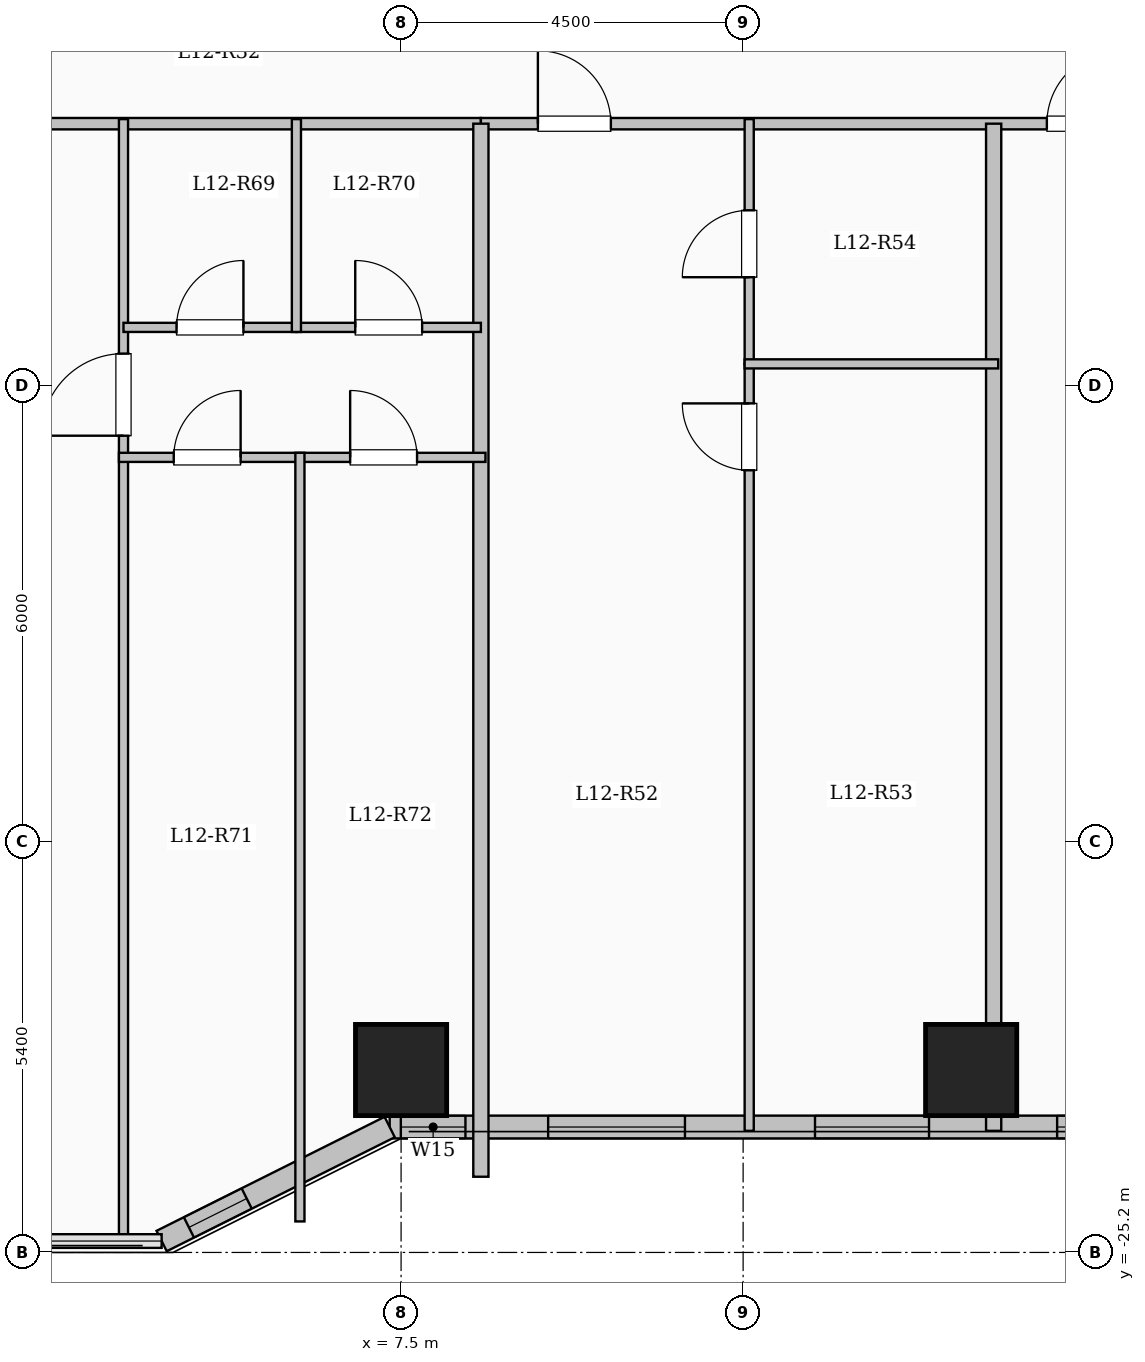
"""IFC4 building model, lengths in metres.
Left out: names, types, materials, properties, quantities, classifications, styles, units other than length and angle.
Written with IfcOpenShell. Run it as: python <this file> out.ifc"""

import sys

from ifc_helpers import new_model, si_unit, direction, frame, frame_2d, origin, origin_2d, place, context, subcontext, project, spatial, rectangle, extrude, element, fill, save


model = new_model("IFC4")
c1 = context("Model", 3, precision=1e-05, world=origin(), true_north=direction((0.0, 1.0)))
c2 = subcontext(c1, "Body", "Model", "MODEL_VIEW")
j1 = project(units=[si_unit("LENGTHUNIT", "METRE"), si_unit("PLANEANGLEUNIT", "RADIAN")], contexts=[c1])
p1 = place(None, origin())
s1 = spatial("IfcSite", under=j1, at=p1, CompositionType="ELEMENT")
p2 = place(p1, origin())
s2 = spatial("IfcBuilding", under=s1, at=p2, CompositionType="ELEMENT")
p3 = place(p2, frame((0.0, 0.0, 47.45)))
s3 = spatial("IfcBuildingStorey", under=s2, at=p3, CompositionType="ELEMENT", Elevation=47.45)
for number, where, z_axis, x_axis in (
    (1, (7.5, -22.8, 0.0), (0.0, 0.0, 1.0), (1.0, 0.0, 0.0)),
    (2, (15.0, -22.8, 0.0), (0.0, 0.0, 1.0), (1.0, 0.0, 0.0)),
):
    element("IfcColumn", number, at=place(p3, frame(where, z_axis=z_axis, x_axis=x_axis)), inside=s3, PredefinedType="COLUMN", context=c2, shape_type="SweptSolid", body=[
        extrude(rectangle(XDim=1.2, YDim=1.2, at=origin_2d()), origin(), (0.0, 0.0, 1.0), 3.35),
    ])
p4 = place(p3, frame((22.65, -23.55, 0.0), z_axis=(0.0, 0.0, 1.0), x_axis=(-1.0, 0.0, 0.0)))
e3 = element("IfcWall", 3, at=p4, inside=s3, PredefinedType="SOLIDWALL", context=c2, shape_type="SweptSolid", body=[
    extrude(rectangle(XDim=15.3, YDim=0.3, at=frame_2d((7.65, 0.0))), origin(), (0.0, 0.0, 1.0), 3.1),
])
p5 = place(p4, frame((0.509, 0.0, 0.95)))
e4 = element("IfcOpeningElement", 4, at=p5, cuts=e3, PredefinedType="OPENING", context=c2, shape_type="SweptSolid", body=[
    extrude(rectangle(XDim=1.2, YDim=1.5, at=frame_2d((0.6, 0.75))), frame((0.0, 0.16, 0.0), z_axis=(0.0, -1.0, 0.0), x_axis=(1.0, 0.0, 0.0)), (0.0, 0.0, 1.0), 0.32),
])
p6 = place(p4, frame((2.585, 0.0, 0.95)))
e5 = element("IfcOpeningElement", 5, at=p6, cuts=e3, PredefinedType="OPENING", context=c2, shape_type="SweptSolid", body=[
    extrude(rectangle(XDim=1.2, YDim=1.5, at=frame_2d((0.6, 0.75))), frame((0.0, 0.16, 0.0), z_axis=(0.0, -1.0, 0.0), x_axis=(1.0, 0.0, 0.0)), (0.0, 0.0, 1.0), 0.32),
])
p7 = place(p4, frame((5.019, 0.0, 0.9)))
e6 = element("IfcOpeningElement", 6, at=p7, cuts=e3, PredefinedType="OPENING", context=c2, shape_type="SweptSolid", body=[
    extrude(rectangle(XDim=1.5, YDim=1.65, at=frame_2d((0.75, 0.825))), frame((0.0, 0.16, 0.0), z_axis=(0.0, -1.0, 0.0), x_axis=(1.0, 0.0, 0.0)), (0.0, 0.0, 1.0), 0.32),
])
p8 = place(p4, frame((8.204, 0.0, 0.9)))
e7 = element("IfcOpeningElement", 7, at=p8, cuts=e3, PredefinedType="OPENING", context=c2, shape_type="SweptSolid", body=[
    extrude(rectangle(XDim=1.5, YDim=1.65, at=frame_2d((0.75, 0.825))), frame((0.0, 0.16, 0.0), z_axis=(0.0, -1.0, 0.0), x_axis=(1.0, 0.0, 0.0)), (0.0, 0.0, 1.0), 0.32),
])
p9 = place(p4, frame((11.415, 0.0, 0.9)))
e8 = element("IfcOpeningElement", 8, at=p9, cuts=e3, PredefinedType="OPENING", context=c2, shape_type="SweptSolid", body=[
    extrude(rectangle(XDim=1.8, YDim=1.65, at=frame_2d((0.9, 0.825))), frame((0.0, 0.16, 0.0), z_axis=(0.0, -1.0, 0.0), x_axis=(1.0, 0.0, 0.0)), (0.0, 0.0, 1.0), 0.32),
])
p10 = place(p4, frame((14.303, 0.0, 0.95)))
e9 = element("IfcOpeningElement", 9, at=p10, cuts=e3, PredefinedType="OPENING", context=c2, shape_type="SweptSolid", body=[
    extrude(rectangle(XDim=0.85, YDim=1.5, at=frame_2d((0.425, 0.75))), frame((0.0, 0.16, 0.0), z_axis=(0.0, -1.0, 0.0), x_axis=(1.0, 0.0, 0.0)), (0.0, 0.0, 1.0), 0.32),
])
p11 = place(p3, frame((7.35, -23.55, 0.0), z_axis=(0.0, 0.0, 1.0), x_axis=(-0.894427191, -0.4472135955, 0.0)))
e10 = element("IfcWall", 10, at=p11, inside=s3, PredefinedType="SOLIDWALL", context=c2, shape_type="SweptSolid", body=[
    extrude(rectangle(XDim=3.354, YDim=0.3, at=frame_2d((1.677, 0.0))), origin(), (0.0, 0.0, 1.0), 3.1),
])
p12 = place(p11, frame((2.103, 0.0, 0.95)))
e11 = element("IfcOpeningElement", 11, at=p12, cuts=e10, PredefinedType="OPENING", context=c2, shape_type="SweptSolid", body=[
    extrude(rectangle(XDim=0.85, YDim=1.5, at=frame_2d((0.425, 0.75))), frame((0.0, 0.16, 0.0), z_axis=(0.0, -1.0, 0.0), x_axis=(1.0, 0.0, 0.0)), (0.0, 0.0, 1.0), 0.32),
])
p13 = place(p3, frame((-8.55, -10.35, 0.0), z_axis=(0.0, 0.0, 1.0), x_axis=(1.0, 0.0, 0.0)))
e12 = element("IfcWall", 12, at=p13, inside=s3, PredefinedType="PARTITIONING", context=c2, shape_type="SweptSolid", body=[
    extrude(rectangle(XDim=17.1, YDim=0.15, at=frame_2d((8.55, 0.0))), origin(), (0.0, 0.0, 1.0), 3.1),
])
p14 = place(p13, frame((0.8, 0.0, 0.0)))
e13 = element("IfcOpeningElement", 13, at=p14, cuts=e12, PredefinedType="OPENING", context=c2, shape_type="SweptSolid", body=[
    extrude(rectangle(XDim=0.96, YDim=2.15, at=frame_2d((0.48, 1.075))), frame((0.0, 0.085, 0.0), z_axis=(0.0, -1.0, 0.0), x_axis=(1.0, 0.0, 0.0)), (0.0, 0.0, 1.0), 0.17),
])
p15 = place(p13, frame((8.495, 0.0, 0.0)))
e14 = element("IfcOpeningElement", 14, at=p15, cuts=e12, PredefinedType="OPENING", context=c2, shape_type="SweptSolid", body=[
    extrude(rectangle(XDim=0.96, YDim=2.15, at=frame_2d((0.48, 1.075))), frame((0.0, 0.085, 0.0), z_axis=(0.0, -1.0, 0.0), x_axis=(1.0, 0.0, 0.0)), (0.0, 0.0, 1.0), 0.17),
])
p16 = place(p3, frame((8.55, -10.35, 0.0), z_axis=(0.0, 0.0, 1.0), x_axis=(1.0, 0.0, 0.0)))
e15 = element("IfcWall", 15, at=p16, inside=s3, PredefinedType="PARTITIONING", context=c2, shape_type="SweptSolid", body=[
    extrude(rectangle(XDim=14.0, YDim=0.15, at=frame_2d((7.0, 0.0))), origin(), (0.0, 0.0, 1.0), 3.1),
])
p17 = place(p16, frame((0.75, 0.0, 0.0)))
e16 = element("IfcOpeningElement", 16, at=p17, cuts=e15, PredefinedType="OPENING", context=c2, shape_type="SweptSolid", body=[
    extrude(rectangle(XDim=0.96, YDim=2.15, at=frame_2d((0.48, 1.075))), frame((0.0, 0.085, 0.0), z_axis=(0.0, -1.0, 0.0), x_axis=(1.0, 0.0, 0.0)), (0.0, 0.0, 1.0), 0.17),
])
p18 = place(p16, frame((7.446, 0.0, 0.0)))
e17 = element("IfcOpeningElement", 17, at=p18, cuts=e15, PredefinedType="OPENING", context=c2, shape_type="SweptSolid", body=[
    extrude(rectangle(XDim=0.96, YDim=2.15, at=frame_2d((0.48, 1.075))), frame((0.0, 0.085, 0.0), z_axis=(0.0, -1.0, 0.0), x_axis=(1.0, 0.0, 0.0)), (0.0, 0.0, 1.0), 0.17),
])
p19 = place(p3, frame((15.296, -23.6, 0.0), z_axis=(0.0, 0.0, 1.0), x_axis=(0.0, 1.0, 0.0)))
e18 = element("IfcWall", 18, at=p19, inside=s3, PredefinedType="SOLIDWALL", context=c2, shape_type="SweptSolid", body=[
    extrude(rectangle(XDim=13.25, YDim=0.2, at=frame_2d((6.625, 0.0))), origin(), (0.0, 0.0, 1.0), 2.435),
])
p20 = place(p3, frame((12.08, -23.6, 0.0), z_axis=(0.0, 0.0, 1.0), x_axis=(0.0, 1.0, 0.0)))
e19 = element("IfcWall", 19, at=p20, inside=s3, PredefinedType="PARTITIONING", context=c2, shape_type="SweptSolid", body=[
    extrude(rectangle(XDim=10.09, YDim=0.12, at=frame_2d((5.045, 0.0))), origin(), (0.0, 0.0, 1.0), 3.1),
])
p21 = place(p20, frame((8.69, 0.0, 0.0)))
e20 = element("IfcOpeningElement", 20, at=p21, cuts=e19, PredefinedType="OPENING", context=c2, shape_type="SweptSolid", body=[
    extrude(rectangle(XDim=0.88, YDim=2.1, at=frame_2d((0.44, 1.05))), frame((0.0, 0.07, 0.0), z_axis=(0.0, -1.0, 0.0), x_axis=(1.0, 0.0, 0.0)), (0.0, 0.0, 1.0), 0.14),
])
p22 = place(p3, frame((12.08, -13.51, 0.0), z_axis=(0.0, 0.0, 1.0), x_axis=(0.0, 1.0, 0.0)))
e21 = element("IfcWall", 21, at=p22, inside=s3, PredefinedType="PARTITIONING", context=c2, shape_type="SweptSolid", body=[
    extrude(rectangle(XDim=3.22, YDim=0.12, at=frame_2d((1.61, 0.0))), origin(), (0.0, 0.0, 1.0), 3.1),
])
p23 = place(p22, frame((1.14, 0.0, 0.0)))
e22 = element("IfcOpeningElement", 22, at=p23, cuts=e21, PredefinedType="OPENING", context=c2, shape_type="SweptSolid", body=[
    extrude(rectangle(XDim=0.88, YDim=2.1, at=frame_2d((0.44, 1.05))), frame((0.0, 0.07, 0.0), z_axis=(0.0, -1.0, 0.0), x_axis=(1.0, 0.0, 0.0)), (0.0, 0.0, 1.0), 0.14),
])
p24 = place(p3, frame((12.02, -13.51, 0.0), z_axis=(0.0, 0.0, 1.0), x_axis=(1.0, 0.0, 0.0)))
e23 = element("IfcWall", 23, at=p24, inside=s3, PredefinedType="PARTITIONING", context=c2, shape_type="SweptSolid", body=[
    extrude(rectangle(XDim=3.336, YDim=0.12, at=frame_2d((1.668, 0.0))), origin(), (0.0, 0.0, 1.0), 3.1),
])
p25 = place(p3, frame((8.55, -24.204, 0.0), z_axis=(0.0, 0.0, 1.0), x_axis=(0.0, 1.0, 0.0)))
e24 = element("IfcWall", 24, at=p25, inside=s3, PredefinedType="SOLIDWALL", context=c2, shape_type="SweptSolid", body=[
    extrude(rectangle(XDim=13.854, YDim=0.2, at=frame_2d((6.927, 0.0))), origin(), (0.0, 0.0, 1.0), 3.1),
])
p26 = place(p3, frame((3.848, -25.08, 0.0), z_axis=(0.0, 0.0, 1.0), x_axis=(0.0, 1.0, 0.0)))
e25 = element("IfcWall", 25, at=p26, inside=s3, PredefinedType="PARTITIONING", context=c2, shape_type="SweptSolid", body=[
    extrude(rectangle(XDim=14.79, YDim=0.12, at=frame_2d((7.395, 0.0))), origin(), (0.0, 0.0, 1.0), 3.1),
])
p27 = place(p26, frame((10.625, 0.0, 0.0)))
e26 = element("IfcOpeningElement", 26, at=p27, cuts=e25, PredefinedType="OPENING", context=c2, shape_type="SweptSolid", body=[
    extrude(rectangle(XDim=1.08, YDim=2.15, at=frame_2d((0.54, 1.075))), frame((0.0, 0.07, 0.0), z_axis=(0.0, -1.0, 0.0), x_axis=(1.0, 0.0, 0.0)), (0.0, 0.0, 1.0), 0.14),
])
p28 = place(p3, frame((3.848, -13.03, 0.0), z_axis=(0.0, 0.0, 1.0), x_axis=(1.0, 0.0, 0.0)))
e27 = element("IfcWall", 27, at=p28, inside=s3, PredefinedType="PARTITIONING", context=c2, shape_type="SweptSolid", body=[
    extrude(rectangle(XDim=2.275, YDim=0.12, at=frame_2d((1.138, 0.0))), origin(), (0.0, 0.0, 1.0), 2.585),
])
p29 = place(p28, frame((0.698, 0.0, 0.0)))
e28 = element("IfcOpeningElement", 28, at=p29, cuts=e27, PredefinedType="OPENING", context=c2, shape_type="SweptSolid", body=[
    extrude(rectangle(XDim=0.88, YDim=2.1, at=frame_2d((0.44, 1.05))), frame((0.0, 0.07, 0.0), z_axis=(0.0, -1.0, 0.0), x_axis=(1.0, 0.0, 0.0)), (0.0, 0.0, 1.0), 0.14),
])
p30 = place(p3, frame((6.123, -13.03, 0.0), z_axis=(0.0, 0.0, 1.0), x_axis=(1.0, 0.0, 0.0)))
e29 = element("IfcWall", 29, at=p30, inside=s3, PredefinedType="PARTITIONING", context=c2, shape_type="SweptSolid", body=[
    extrude(rectangle(XDim=2.427, YDim=0.12, at=frame_2d((1.213, 0.0))), origin(), (0.0, 0.0, 1.0), 2.585),
])
p31 = place(p30, frame((0.774, 0.0, 0.0)))
e30 = element("IfcOpeningElement", 30, at=p31, cuts=e29, PredefinedType="OPENING", context=c2, shape_type="SweptSolid", body=[
    extrude(rectangle(XDim=0.88, YDim=2.1, at=frame_2d((0.44, 1.05))), frame((0.0, 0.07, 0.0), z_axis=(0.0, -1.0, 0.0), x_axis=(1.0, 0.0, 0.0)), (0.0, 0.0, 1.0), 0.14),
])
p32 = place(p3, frame((3.788, -14.74, 0.0), z_axis=(0.0, 0.0, 1.0), x_axis=(1.0, 0.0, 0.0)))
e31 = element("IfcWall", 31, at=p32, inside=s3, PredefinedType="PARTITIONING", context=c2, shape_type="SweptSolid", body=[
    extrude(rectangle(XDim=4.822, YDim=0.12, at=frame_2d((2.411, 0.0))), origin(), (0.0, 0.0, 1.0), 2.585),
])
p33 = place(p32, frame((0.721, 0.0, 0.0)))
e32 = element("IfcOpeningElement", 32, at=p33, cuts=e31, PredefinedType="OPENING", context=c2, shape_type="SweptSolid", body=[
    extrude(rectangle(XDim=0.88, YDim=2.1, at=frame_2d((0.44, 1.05))), frame((0.0, 0.07, 0.0), z_axis=(0.0, -1.0, 0.0), x_axis=(1.0, 0.0, 0.0)), (0.0, 0.0, 1.0), 0.14),
])
p34 = place(p32, frame((3.042, 0.0, 0.0)))
e33 = element("IfcOpeningElement", 33, at=p34, cuts=e31, PredefinedType="OPENING", context=c2, shape_type="SweptSolid", body=[
    extrude(rectangle(XDim=0.88, YDim=2.1, at=frame_2d((0.44, 1.05))), frame((0.0, 0.07, 0.0), z_axis=(0.0, -1.0, 0.0), x_axis=(1.0, 0.0, 0.0)), (0.0, 0.0, 1.0), 0.14),
])
p35 = place(p3, frame((6.123, -13.09, 0.0), z_axis=(0.0, 0.0, 1.0), x_axis=(0.0, 1.0, 0.0)))
e34 = element("IfcWall", 34, at=p35, inside=s3, PredefinedType="PARTITIONING", context=c2, shape_type="SweptSolid", body=[
    extrude(rectangle(XDim=2.8, YDim=0.12, at=frame_2d((1.4, 0.0))), origin(), (0.0, 0.0, 1.0), 3.1),
])
p36 = place(p3, frame((6.169, -24.792, 0.0), z_axis=(0.0, 0.0, 1.0), x_axis=(0.0, 1.0, 0.0)))
e35 = element("IfcWall", 35, at=p36, inside=s3, PredefinedType="PARTITIONING", context=c2, shape_type="SweptSolid", body=[
    extrude(rectangle(XDim=10.112, YDim=0.12, at=frame_2d((5.056, 0.0))), origin(), (0.0, 0.0, 1.0), 3.1),
])
p37 = place(p7, origin())
e36 = element("IfcWindow", 36, at=p37, inside=s3, PartitioningType="SINGLE_PANEL", PredefinedType="WINDOW", context=c2, shape_type="SweptSolid", body=[
    extrude(rectangle(XDim=1.5, YDim=1.65, at=frame_2d((0.75, 0.825))), frame((0.0, 0.03, 0.0), z_axis=(0.0, -1.0, 0.0), x_axis=(1.0, 0.0, 0.0)), (0.0, 0.0, 1.0), 0.06),
])
fill(e6, e36)
p38 = place(p8, origin())
e37 = element("IfcWindow", 37, at=p38, inside=s3, PartitioningType="SINGLE_PANEL", PredefinedType="WINDOW", context=c2, shape_type="SweptSolid", body=[
    extrude(rectangle(XDim=1.5, YDim=1.65, at=frame_2d((0.75, 0.825))), frame((0.0, 0.03, 0.0), z_axis=(0.0, -1.0, 0.0), x_axis=(1.0, 0.0, 0.0)), (0.0, 0.0, 1.0), 0.06),
])
fill(e7, e37)
p39 = place(p9, origin())
e38 = element("IfcWindow", 38, at=p39, inside=s3, PartitioningType="SINGLE_PANEL", PredefinedType="WINDOW", context=c2, shape_type="SweptSolid", body=[
    extrude(rectangle(XDim=1.8, YDim=1.65, at=frame_2d((0.9, 0.825))), frame((0.0, 0.03, 0.0), z_axis=(0.0, -1.0, 0.0), x_axis=(1.0, 0.0, 0.0)), (0.0, 0.0, 1.0), 0.06),
])
fill(e8, e38)
p40 = place(p10, origin())
e39 = element("IfcWindow", 39, at=p40, inside=s3, PartitioningType="SINGLE_PANEL", PredefinedType="WINDOW", context=c2, shape_type="SweptSolid", body=[
    extrude(rectangle(XDim=0.85, YDim=1.5, at=frame_2d((0.425, 0.75))), frame((0.0, 0.03, 0.0), z_axis=(0.0, -1.0, 0.0), x_axis=(1.0, 0.0, 0.0)), (0.0, 0.0, 1.0), 0.06),
])
fill(e9, e39)
p41 = place(p12, origin())
e40 = element("IfcWindow", 40, at=p41, inside=s3, PartitioningType="SINGLE_PANEL", PredefinedType="WINDOW", context=c2, shape_type="SweptSolid", body=[
    extrude(rectangle(XDim=0.85, YDim=1.5, at=frame_2d((0.425, 0.75))), frame((0.0, 0.03, 0.0), z_axis=(0.0, -1.0, 0.0), x_axis=(1.0, 0.0, 0.0)), (0.0, 0.0, 1.0), 0.06),
])
fill(e11, e40)
p42 = place(p17, origin())
e41 = element("IfcDoor", 41, at=p42, inside=s3, OperationType="SINGLE_SWING_LEFT", PredefinedType="DOOR", context=c2, shape_type="SweptSolid", body=[
    extrude(rectangle(XDim=0.96, YDim=2.15, at=frame_2d((0.48, 1.075))), frame((0.0, 0.025, 0.0), z_axis=(0.0, -1.0, 0.0), x_axis=(1.0, 0.0, 0.0)), (0.0, 0.0, 1.0), 0.05),
])
fill(e16, e41)
p43 = place(p21, origin())
e42 = element("IfcDoor", 42, at=p43, inside=s3, OperationType="SINGLE_SWING_RIGHT", PredefinedType="DOOR", context=c2, shape_type="SweptSolid", body=[
    extrude(rectangle(XDim=0.88, YDim=2.1, at=frame_2d((0.44, 1.05))), frame((0.0, 0.025, 0.0), z_axis=(0.0, -1.0, 0.0), x_axis=(1.0, 0.0, 0.0)), (0.0, 0.0, 1.0), 0.05),
])
fill(e20, e42)
p44 = place(p23, origin())
e43 = element("IfcDoor", 43, at=p44, inside=s3, OperationType="SINGLE_SWING_LEFT", PredefinedType="DOOR", context=c2, shape_type="SweptSolid", body=[
    extrude(rectangle(XDim=0.88, YDim=2.1, at=frame_2d((0.44, 1.05))), frame((0.0, 0.025, 0.0), z_axis=(0.0, -1.0, 0.0), x_axis=(1.0, 0.0, 0.0)), (0.0, 0.0, 1.0), 0.05),
])
fill(e22, e43)
p45 = place(p18, origin())
e44 = element("IfcDoor", 44, at=p45, inside=s3, OperationType="SINGLE_SWING_RIGHT", PredefinedType="DOOR", context=c2, shape_type="SweptSolid", body=[
    extrude(rectangle(XDim=0.96, YDim=2.15, at=frame_2d((0.48, 1.075))), frame((0.0, 0.025, 0.0), z_axis=(0.0, -1.0, 0.0), x_axis=(1.0, 0.0, 0.0)), (0.0, 0.0, 1.0), 0.05),
])
fill(e17, e44)
p46 = place(p27, origin())
e45 = element("IfcDoor", 45, at=p46, inside=s3, OperationType="SINGLE_SWING_LEFT", PredefinedType="DOOR", context=c2, shape_type="SweptSolid", body=[
    extrude(rectangle(XDim=1.08, YDim=2.15, at=frame_2d((0.54, 1.075))), frame((0.0, 0.025, 0.0), z_axis=(0.0, -1.0, 0.0), x_axis=(1.0, 0.0, 0.0)), (0.0, 0.0, 1.0), 0.05),
])
fill(e26, e45)
p47 = place(p29, origin())
e46 = element("IfcDoor", 46, at=p47, inside=s3, OperationType="SINGLE_SWING_RIGHT", PredefinedType="DOOR", context=c2, shape_type="SweptSolid", body=[
    extrude(rectangle(XDim=0.88, YDim=2.1, at=frame_2d((0.44, 1.05))), frame((0.0, 0.025, 0.0), z_axis=(0.0, -1.0, 0.0), x_axis=(1.0, 0.0, 0.0)), (0.0, 0.0, 1.0), 0.05),
])
fill(e28, e46)
p48 = place(p31, origin())
e47 = element("IfcDoor", 47, at=p48, inside=s3, OperationType="SINGLE_SWING_LEFT", PredefinedType="DOOR", context=c2, shape_type="SweptSolid", body=[
    extrude(rectangle(XDim=0.88, YDim=2.1, at=frame_2d((0.44, 1.05))), frame((0.0, 0.025, 0.0), z_axis=(0.0, -1.0, 0.0), x_axis=(1.0, 0.0, 0.0)), (0.0, 0.0, 1.0), 0.05),
])
fill(e30, e47)
p49 = place(p33, origin())
e48 = element("IfcDoor", 48, at=p49, inside=s3, OperationType="SINGLE_SWING_RIGHT", PredefinedType="DOOR", context=c2, shape_type="SweptSolid", body=[
    extrude(rectangle(XDim=0.88, YDim=2.1, at=frame_2d((0.44, 1.05))), frame((0.0, 0.025, 0.0), z_axis=(0.0, -1.0, 0.0), x_axis=(1.0, 0.0, 0.0)), (0.0, 0.0, 1.0), 0.05),
])
fill(e32, e48)
p50 = place(p34, origin())
e49 = element("IfcDoor", 49, at=p50, inside=s3, OperationType="SINGLE_SWING_LEFT", PredefinedType="DOOR", context=c2, shape_type="SweptSolid", body=[
    extrude(rectangle(XDim=0.88, YDim=2.1, at=frame_2d((0.44, 1.05))), frame((0.0, 0.025, 0.0), z_axis=(0.0, -1.0, 0.0), x_axis=(1.0, 0.0, 0.0)), (0.0, 0.0, 1.0), 0.05),
])
fill(e33, e49)
save(model, sys.argv[1])
